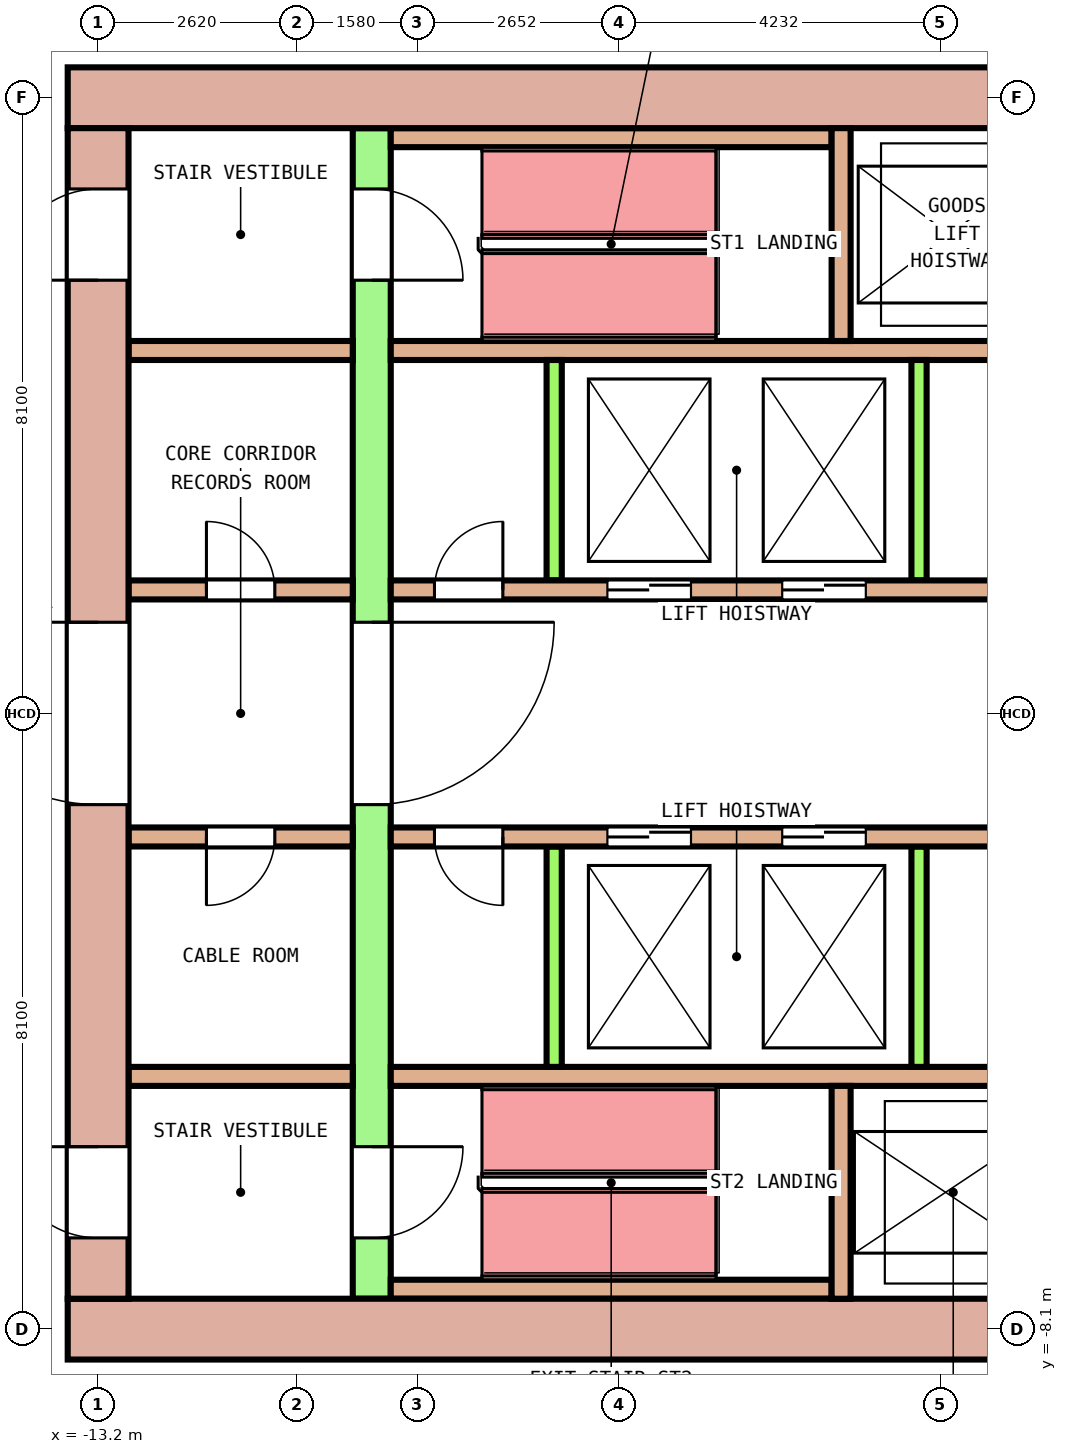
"""IFC4 building model, lengths in metres.
Left out: names, types, materials, properties, quantities, classifications, styles, units other than length and angle.
Written with IfcOpenShell. Run it as: python <this file> out.ifc"""

import sys

from ifc_helpers import new_model, si_unit, direction, frame, frame_2d, origin, place, context, subcontext, project, spatial, rectangle, extrude, element, fill, save


model = new_model("IFC4")
c1 = context("Model", 3, precision=1e-05, world=origin(), true_north=direction((0.0, 1.0)))
c2 = subcontext(c1, "Body", "Model", "MODEL_VIEW")
j1 = project(units=[si_unit("LENGTHUNIT", "METRE"), si_unit("PLANEANGLEUNIT", "RADIAN")], contexts=[c1])
p1 = place(None, origin())
s1 = spatial("IfcSite", under=j1, at=p1, CompositionType="ELEMENT")
p2 = place(p1, origin())
s2 = spatial("IfcBuilding", under=s1, at=p2, CompositionType="ELEMENT")
p3 = place(p2, frame((0.0, 0.0, 130.8)))
s3 = spatial("IfcBuildingStorey", under=s2, at=p3, CompositionType="ELEMENT", Elevation=130.8)
p4 = place(p3, frame((-13.6, 8.1, 0.0), z_axis=(0.0, 0.0, 1.0), x_axis=(1.0, 0.0, 0.0)))
e1 = element("IfcWall", 1, at=p4, inside=s3, PredefinedType="SHEAR", context=c2, shape_type="SweptSolid", body=[
    extrude(rectangle(XDim=27.2, YDim=0.8, at=frame_2d((13.6, 0.0))), origin(), (0.0, 0.0, 1.0), 4.1),
])
p5 = place(p4, frame((14.525, 0.0, 0.0)))
e2 = element("IfcOpeningElement", 2, at=p5, cuts=e1, PredefinedType="OPENING", context=c2, shape_type="SweptSolid", body=[
    extrude(rectangle(XDim=1.4, YDim=2.1, at=frame_2d((0.7, 1.05))), frame((0.0, 0.41, 0.0), z_axis=(0.0, -1.0, 0.0), x_axis=(1.0, 0.0, 0.0)), (0.0, 0.0, 1.0), 0.82),
])
p6 = place(p3, frame((-13.6, -8.1, 0.0), z_axis=(0.0, 0.0, 1.0), x_axis=(1.0, 0.0, 0.0)))
e3 = element("IfcWall", 3, at=p6, inside=s3, PredefinedType="SHEAR", context=c2, shape_type="SweptSolid", body=[
    extrude(rectangle(XDim=27.2, YDim=0.8, at=frame_2d((13.6, 0.0))), origin(), (0.0, 0.0, 1.0), 4.1),
])
p7 = place(p6, frame((15.15, 0.0, 0.0)))
e4 = element("IfcOpeningElement", 4, at=p7, cuts=e3, PredefinedType="OPENING", context=c2, shape_type="SweptSolid", body=[
    extrude(rectangle(XDim=1.2, YDim=2.1, at=frame_2d((0.6, 1.05))), frame((0.0, 0.41, 0.0), z_axis=(0.0, -1.0, 0.0), x_axis=(1.0, 0.0, 0.0)), (0.0, 0.0, 1.0), 0.82),
])
p8 = place(p3, frame((-13.2, -7.7, 0.0), z_axis=(0.0, 0.0, 1.0), x_axis=(0.0, 1.0, 0.0)))
e5 = element("IfcWall", 5, at=p8, inside=s3, PredefinedType="SHEAR", context=c2, shape_type="SweptSolid", body=[
    extrude(rectangle(XDim=15.4, YDim=0.8, at=frame_2d((7.7, 0.0))), origin(), (0.0, 0.0, 1.0), 4.1),
])
p9 = place(p8, frame((6.5, 0.0, 0.0)))
e6 = element("IfcOpeningElement", 6, at=p9, cuts=e5, PredefinedType="OPENING", context=c2, shape_type="SweptSolid", body=[
    extrude(rectangle(XDim=2.4, YDim=2.1, at=frame_2d((1.2, 1.05))), frame((0.0, 0.41, 0.0), z_axis=(0.0, -1.0, 0.0), x_axis=(1.0, 0.0, 0.0)), (0.0, 0.0, 1.0), 0.82),
])
p10 = place(p8, frame((13.4, 0.0, 0.0)))
e7 = element("IfcOpeningElement", 7, at=p10, cuts=e5, PredefinedType="OPENING", context=c2, shape_type="SweptSolid", body=[
    extrude(rectangle(XDim=1.2, YDim=2.1, at=frame_2d((0.6, 1.05))), frame((0.0, 0.41, 0.0), z_axis=(0.0, -1.0, 0.0), x_axis=(1.0, 0.0, 0.0)), (0.0, 0.0, 1.0), 0.82),
])
p11 = place(p8, frame((0.8, 0.0, 0.0)))
e8 = element("IfcOpeningElement", 8, at=p11, cuts=e5, PredefinedType="OPENING", context=c2, shape_type="SweptSolid", body=[
    extrude(rectangle(XDim=1.2, YDim=2.1, at=frame_2d((0.6, 1.05))), frame((0.0, 0.41, 0.0), z_axis=(0.0, -1.0, 0.0), x_axis=(1.0, 0.0, 0.0)), (0.0, 0.0, 1.0), 0.82),
])
p12 = place(p3, frame((-9.6, -7.7, 0.0), z_axis=(0.0, 0.0, 1.0), x_axis=(0.0, 1.0, 0.0)))
e9 = element("IfcWall", 9, at=p12, inside=s3, PredefinedType="SHEAR", context=c2, shape_type="SweptSolid", body=[
    extrude(rectangle(XDim=15.4, YDim=0.5, at=frame_2d((7.7, 0.0))), origin(), (0.0, 0.0, 1.0), 4.1),
])
p13 = place(p12, frame((6.5, 0.0, 0.0)))
e10 = element("IfcOpeningElement", 10, at=p13, cuts=e9, PredefinedType="OPENING", context=c2, shape_type="SweptSolid", body=[
    extrude(rectangle(XDim=2.4, YDim=2.1, at=frame_2d((1.2, 1.05))), frame((0.0, 0.26, 0.0), z_axis=(0.0, -1.0, 0.0), x_axis=(1.0, 0.0, 0.0)), (0.0, 0.0, 1.0), 0.52),
])
p14 = place(p12, frame((13.4, 0.0, 0.0)))
e11 = element("IfcOpeningElement", 11, at=p14, cuts=e9, PredefinedType="OPENING", context=c2, shape_type="SweptSolid", body=[
    extrude(rectangle(XDim=1.2, YDim=2.1, at=frame_2d((0.6, 1.05))), frame((0.0, 0.26, 0.0), z_axis=(0.0, -1.0, 0.0), x_axis=(1.0, 0.0, 0.0)), (0.0, 0.0, 1.0), 0.52),
])
p15 = place(p12, frame((0.8, 0.0, 0.0)))
e12 = element("IfcOpeningElement", 12, at=p15, cuts=e9, PredefinedType="OPENING", context=c2, shape_type="SweptSolid", body=[
    extrude(rectangle(XDim=1.2, YDim=2.1, at=frame_2d((0.6, 1.05))), frame((0.0, 0.26, 0.0), z_axis=(0.0, -1.0, 0.0), x_axis=(1.0, 0.0, 0.0)), (0.0, 0.0, 1.0), 0.52),
])
p16 = place(p3, frame((-12.8, 1.625, 0.0), z_axis=(0.0, 0.0, 1.0), x_axis=(1.0, 0.0, 0.0)))
e13 = element("IfcWall", 13, at=p16, inside=s3, PredefinedType="SOLIDWALL", context=c2, shape_type="SweptSolid", body=[
    extrude(rectangle(XDim=2.95, YDim=0.25, at=frame_2d((1.475, 0.0))), origin(), (0.0, 0.0, 1.0), 4.1),
])
p17 = place(p16, frame((1.025, 0.0, 0.0)))
e14 = element("IfcOpeningElement", 14, at=p17, cuts=e13, PredefinedType="OPENING", context=c2, shape_type="SweptSolid", body=[
    extrude(rectangle(XDim=0.9, YDim=2.1, at=frame_2d((0.45, 1.05))), frame((0.0, 0.135, 0.0), z_axis=(0.0, -1.0, 0.0), x_axis=(1.0, 0.0, 0.0)), (0.0, 0.0, 1.0), 0.27),
])
p18 = place(p3, frame((-9.35, 1.625, 0.0), z_axis=(0.0, 0.0, 1.0), x_axis=(1.0, 0.0, 0.0)))
e15 = element("IfcWall", 15, at=p18, inside=s3, PredefinedType="SOLIDWALL", context=c2, shape_type="SweptSolid", body=[
    extrude(rectangle(XDim=18.7, YDim=0.25, at=frame_2d((9.35, 0.0))), origin(), (0.0, 0.0, 1.0), 4.1),
])
p19 = place(p18, frame((2.85, 0.0, 0.0)))
e16 = element("IfcOpeningElement", 16, at=p19, cuts=e15, PredefinedType="OPENING", context=c2, shape_type="SweptSolid", body=[
    extrude(rectangle(XDim=1.1, YDim=2.1, at=frame_2d((0.55, 1.05))), frame((0.0, 0.135, 0.0), z_axis=(0.0, -1.0, 0.0), x_axis=(1.0, 0.0, 0.0)), (0.0, 0.0, 1.0), 0.27),
])
p20 = place(p18, frame((5.15, 0.0, 0.0)))
e17 = element("IfcOpeningElement", 17, at=p20, cuts=e15, PredefinedType="OPENING", context=c2, shape_type="SweptSolid", body=[
    extrude(rectangle(XDim=1.1, YDim=2.1, at=frame_2d((0.55, 1.05))), frame((0.0, 0.135, 0.0), z_axis=(0.0, -1.0, 0.0), x_axis=(1.0, 0.0, 0.0)), (0.0, 0.0, 1.0), 0.27),
])
p21 = place(p18, frame((14.8, 0.0, 0.0)))
e18 = element("IfcOpeningElement", 18, at=p21, cuts=e15, PredefinedType="OPENING", context=c2, shape_type="SweptSolid", body=[
    extrude(rectangle(XDim=1.1, YDim=2.1, at=frame_2d((0.55, 1.05))), frame((0.0, 0.135, 0.0), z_axis=(0.0, -1.0, 0.0), x_axis=(1.0, 0.0, 0.0)), (0.0, 0.0, 1.0), 0.27),
])
p22 = place(p18, frame((0.575, 0.0, 0.0)))
e19 = element("IfcOpeningElement", 19, at=p22, cuts=e15, PredefinedType="OPENING", context=c2, shape_type="SweptSolid", body=[
    extrude(rectangle(XDim=0.9, YDim=2.1, at=frame_2d((0.45, 1.05))), frame((0.0, 0.135, 0.0), z_axis=(0.0, -1.0, 0.0), x_axis=(1.0, 0.0, 0.0)), (0.0, 0.0, 1.0), 0.27),
])
p23 = place(p18, frame((17.225, 0.0, 0.0)))
e20 = element("IfcOpeningElement", 20, at=p23, cuts=e15, PredefinedType="OPENING", context=c2, shape_type="SweptSolid", body=[
    extrude(rectangle(XDim=0.9, YDim=2.1, at=frame_2d((0.45, 1.05))), frame((0.0, 0.135, 0.0), z_axis=(0.0, -1.0, 0.0), x_axis=(1.0, 0.0, 0.0)), (0.0, 0.0, 1.0), 0.27),
])
p24 = place(p3, frame((-12.8, 4.775, 0.0), z_axis=(0.0, 0.0, 1.0), x_axis=(1.0, 0.0, 0.0)))
e21 = element("IfcWall", 21, at=p24, inside=s3, PredefinedType="SOLIDWALL", context=c2, shape_type="SweptSolid", body=[
    extrude(rectangle(XDim=2.95, YDim=0.25, at=frame_2d((1.475, 0.0))), origin(), (0.0, 0.0, 1.0), 4.1),
])
p25 = place(p3, frame((-9.35, 4.775, 0.0), z_axis=(0.0, 0.0, 1.0), x_axis=(1.0, 0.0, 0.0)))
e22 = element("IfcWall", 22, at=p25, inside=s3, PredefinedType="SOLIDWALL", context=c2, shape_type="SweptSolid", body=[
    extrude(rectangle(XDim=18.7, YDim=0.25, at=frame_2d((9.35, 0.0))), origin(), (0.0, 0.0, 1.0), 4.1),
])
for number, where, z_axis, x_axis in (
    (23, (-7.2, 1.75, 0.0), (0.0, 0.0, 1.0), (0.0, 1.0, 0.0)),
    (24, (-2.4, 1.75, 0.0), (0.0, 0.0, 1.0), (0.0, 1.0, 0.0)),
):
    element("IfcWall", number, at=place(p3, frame(where, z_axis=z_axis, x_axis=x_axis)), inside=s3, PredefinedType="SOLIDWALL", context=c2, shape_type="SweptSolid", body=[
        extrude(rectangle(XDim=2.9, YDim=0.2, at=frame_2d((1.45, 0.0))), origin(), (0.0, 0.0, 1.0), 4.1),
    ])
p26 = place(p3, frame((-12.8, -1.625, 0.0), z_axis=(0.0, 0.0, 1.0), x_axis=(1.0, 0.0, 0.0)))
e25 = element("IfcWall", 25, at=p26, inside=s3, PredefinedType="SOLIDWALL", context=c2, shape_type="SweptSolid", body=[
    extrude(rectangle(XDim=2.95, YDim=0.25, at=frame_2d((1.475, 0.0))), origin(), (0.0, 0.0, 1.0), 4.1),
])
p27 = place(p26, frame((1.025, 0.0, 0.0)))
e26 = element("IfcOpeningElement", 26, at=p27, cuts=e25, PredefinedType="OPENING", context=c2, shape_type="SweptSolid", body=[
    extrude(rectangle(XDim=0.9, YDim=2.1, at=frame_2d((0.45, 1.05))), frame((0.0, 0.135, 0.0), z_axis=(0.0, -1.0, 0.0), x_axis=(1.0, 0.0, 0.0)), (0.0, 0.0, 1.0), 0.27),
])
p28 = place(p3, frame((-9.35, -1.625, 0.0), z_axis=(0.0, 0.0, 1.0), x_axis=(1.0, 0.0, 0.0)))
e27 = element("IfcWall", 27, at=p28, inside=s3, PredefinedType="SOLIDWALL", context=c2, shape_type="SweptSolid", body=[
    extrude(rectangle(XDim=18.7, YDim=0.25, at=frame_2d((9.35, 0.0))), origin(), (0.0, 0.0, 1.0), 4.1),
])
p29 = place(p28, frame((2.85, 0.0, 0.0)))
e28 = element("IfcOpeningElement", 28, at=p29, cuts=e27, PredefinedType="OPENING", context=c2, shape_type="SweptSolid", body=[
    extrude(rectangle(XDim=1.1, YDim=2.1, at=frame_2d((0.55, 1.05))), frame((0.0, 0.135, 0.0), z_axis=(0.0, -1.0, 0.0), x_axis=(1.0, 0.0, 0.0)), (0.0, 0.0, 1.0), 0.27),
])
p30 = place(p28, frame((5.15, 0.0, 0.0)))
e29 = element("IfcOpeningElement", 29, at=p30, cuts=e27, PredefinedType="OPENING", context=c2, shape_type="SweptSolid", body=[
    extrude(rectangle(XDim=1.1, YDim=2.1, at=frame_2d((0.55, 1.05))), frame((0.0, 0.135, 0.0), z_axis=(0.0, -1.0, 0.0), x_axis=(1.0, 0.0, 0.0)), (0.0, 0.0, 1.0), 0.27),
])
p31 = place(p28, frame((14.8, 0.0, 0.0)))
e30 = element("IfcOpeningElement", 30, at=p31, cuts=e27, PredefinedType="OPENING", context=c2, shape_type="SweptSolid", body=[
    extrude(rectangle(XDim=1.1, YDim=2.1, at=frame_2d((0.55, 1.05))), frame((0.0, 0.135, 0.0), z_axis=(0.0, -1.0, 0.0), x_axis=(1.0, 0.0, 0.0)), (0.0, 0.0, 1.0), 0.27),
])
p32 = place(p28, frame((0.575, 0.0, 0.0)))
e31 = element("IfcOpeningElement", 31, at=p32, cuts=e27, PredefinedType="OPENING", context=c2, shape_type="SweptSolid", body=[
    extrude(rectangle(XDim=0.9, YDim=2.1, at=frame_2d((0.45, 1.05))), frame((0.0, 0.135, 0.0), z_axis=(0.0, -1.0, 0.0), x_axis=(1.0, 0.0, 0.0)), (0.0, 0.0, 1.0), 0.27),
])
p33 = place(p28, frame((17.225, 0.0, 0.0)))
e32 = element("IfcOpeningElement", 32, at=p33, cuts=e27, PredefinedType="OPENING", context=c2, shape_type="SweptSolid", body=[
    extrude(rectangle(XDim=0.9, YDim=2.1, at=frame_2d((0.45, 1.05))), frame((0.0, 0.135, 0.0), z_axis=(0.0, -1.0, 0.0), x_axis=(1.0, 0.0, 0.0)), (0.0, 0.0, 1.0), 0.27),
])
p34 = place(p3, frame((-12.8, -4.775, 0.0), z_axis=(0.0, 0.0, 1.0), x_axis=(1.0, 0.0, 0.0)))
e33 = element("IfcWall", 33, at=p34, inside=s3, PredefinedType="SOLIDWALL", context=c2, shape_type="SweptSolid", body=[
    extrude(rectangle(XDim=2.95, YDim=0.25, at=frame_2d((1.475, 0.0))), origin(), (0.0, 0.0, 1.0), 4.1),
])
p35 = place(p3, frame((-9.35, -4.775, 0.0), z_axis=(0.0, 0.0, 1.0), x_axis=(1.0, 0.0, 0.0)))
e34 = element("IfcWall", 34, at=p35, inside=s3, PredefinedType="SOLIDWALL", context=c2, shape_type="SweptSolid", body=[
    extrude(rectangle(XDim=18.7, YDim=0.25, at=frame_2d((9.35, 0.0))), origin(), (0.0, 0.0, 1.0), 4.1),
])
for number, where, z_axis, x_axis in (
    (35, (-7.2, -4.65, 0.0), (0.0, 0.0, 1.0), (0.0, 1.0, 0.0)),
    (36, (-2.4, -4.65, 0.0), (0.0, 0.0, 1.0), (0.0, 1.0, 0.0)),
):
    element("IfcWall", number, at=place(p3, frame(where, z_axis=z_axis, x_axis=x_axis)), inside=s3, PredefinedType="SOLIDWALL", context=c2, shape_type="SweptSolid", body=[
        extrude(rectangle(XDim=2.9, YDim=0.2, at=frame_2d((1.45, 0.0))), origin(), (0.0, 0.0, 1.0), 4.1),
    ])
p36 = place(p3, frame((-9.35, 7.575, 0.0), z_axis=(0.0, 0.0, 1.0), x_axis=(1.0, 0.0, 0.0)))
e37 = element("IfcWall", 37, at=p36, inside=s3, PredefinedType="SOLIDWALL", context=c2, shape_type="SweptSolid", body=[
    extrude(rectangle(XDim=5.8, YDim=0.25, at=frame_2d((2.9, 0.0))), origin(), (0.0, 0.0, 1.0), 4.1),
])
p37 = place(p3, frame((-3.425, 4.9, 0.0), z_axis=(0.0, 0.0, 1.0), x_axis=(0.0, 1.0, 0.0)))
e38 = element("IfcWall", 38, at=p37, inside=s3, PredefinedType="SOLIDWALL", context=c2, shape_type="SweptSolid", body=[
    extrude(rectangle(XDim=2.8, YDim=0.25, at=frame_2d((1.4, 0.0))), origin(), (0.0, 0.0, 1.0), 4.1),
])
p38 = place(p3, frame((-9.35, -7.575, 0.0), z_axis=(0.0, 0.0, 1.0), x_axis=(1.0, 0.0, 0.0)))
e39 = element("IfcWall", 39, at=p38, inside=s3, PredefinedType="SOLIDWALL", context=c2, shape_type="SweptSolid", body=[
    extrude(rectangle(XDim=5.8, YDim=0.25, at=frame_2d((2.9, 0.0))), origin(), (0.0, 0.0, 1.0), 4.1),
])
p39 = place(p3, frame((-3.425, -7.7, 0.0), z_axis=(0.0, 0.0, 1.0), x_axis=(0.0, 1.0, 0.0)))
e40 = element("IfcWall", 40, at=p39, inside=s3, PredefinedType="SOLIDWALL", context=c2, shape_type="SweptSolid", body=[
    extrude(rectangle(XDim=2.8, YDim=0.25, at=frame_2d((1.4, 0.0))), origin(), (0.0, 0.0, 1.0), 4.1),
])
p40 = place(p19, origin())
e41 = element("IfcDoor", 41, at=p40, inside=s3, OperationType="DOUBLE_DOOR_SLIDING", PredefinedType="DOOR", context=c2, shape_type="SweptSolid", body=[
    extrude(rectangle(XDim=1.1, YDim=2.1, at=frame_2d((0.55, 1.05))), frame((0.0, 0.075, 0.0), z_axis=(0.0, -1.0, 0.0), x_axis=(1.0, 0.0, 0.0)), (0.0, 0.0, 1.0), 0.15),
])
fill(e16, e41)
p41 = place(p20, origin())
e42 = element("IfcDoor", 42, at=p41, inside=s3, OperationType="DOUBLE_DOOR_SLIDING", PredefinedType="DOOR", context=c2, shape_type="SweptSolid", body=[
    extrude(rectangle(XDim=1.1, YDim=2.1, at=frame_2d((0.55, 1.05))), frame((0.0, 0.075, 0.0), z_axis=(0.0, -1.0, 0.0), x_axis=(1.0, 0.0, 0.0)), (0.0, 0.0, 1.0), 0.15),
])
fill(e17, e42)
p42 = place(p29, origin())
e43 = element("IfcDoor", 43, at=p42, inside=s3, OperationType="DOUBLE_DOOR_SLIDING", PredefinedType="DOOR", context=c2, shape_type="SweptSolid", body=[
    extrude(rectangle(XDim=1.1, YDim=2.1, at=frame_2d((0.55, 1.05))), frame((0.0, 0.075, 0.0), z_axis=(0.0, -1.0, 0.0), x_axis=(1.0, 0.0, 0.0)), (0.0, 0.0, 1.0), 0.15),
])
fill(e28, e43)
p43 = place(p30, origin())
e44 = element("IfcDoor", 44, at=p43, inside=s3, OperationType="DOUBLE_DOOR_SLIDING", PredefinedType="DOOR", context=c2, shape_type="SweptSolid", body=[
    extrude(rectangle(XDim=1.1, YDim=2.1, at=frame_2d((0.55, 1.05))), frame((0.0, 0.075, 0.0), z_axis=(0.0, -1.0, 0.0), x_axis=(1.0, 0.0, 0.0)), (0.0, 0.0, 1.0), 0.15),
])
fill(e29, e44)
p44 = place(p13, origin())
e45 = element("IfcDoor", 45, at=p44, inside=s3, OperationType="DOUBLE_DOOR_SINGLE_SWING", PredefinedType="DOOR", context=c2, shape_type="SweptSolid", body=[
    extrude(rectangle(XDim=2.4, YDim=2.1, at=frame_2d((1.2, 1.05))), frame((0.0, 0.2, 0.0), z_axis=(0.0, -1.0, 0.0), x_axis=(1.0, 0.0, 0.0)), (0.0, 0.0, 1.0), 0.4),
])
fill(e10, e45)
p45 = place(p9, origin())
e46 = element("IfcDoor", 46, at=p45, inside=s3, OperationType="DOUBLE_DOOR_SINGLE_SWING", PredefinedType="DOOR", context=c2, shape_type="SweptSolid", body=[
    extrude(rectangle(XDim=2.4, YDim=2.1, at=frame_2d((1.2, 1.05))), frame((0.0, 0.3, 0.0), z_axis=(0.0, -1.0, 0.0), x_axis=(1.0, 0.0, 0.0)), (0.0, 0.0, 1.0), 0.6),
])
fill(e6, e46)
p46 = place(p14, origin())
e47 = element("IfcDoor", 47, at=p46, inside=s3, OperationType="SINGLE_SWING_RIGHT", PredefinedType="DOOR", context=c2, shape_type="SweptSolid", body=[
    extrude(rectangle(XDim=1.2, YDim=2.1, at=frame_2d((0.6, 1.05))), frame((0.0, 0.2, 0.0), z_axis=(0.0, -1.0, 0.0), x_axis=(1.0, 0.0, 0.0)), (0.0, 0.0, 1.0), 0.4),
])
fill(e11, e47)
p47 = place(p10, origin())
e48 = element("IfcDoor", 48, at=p47, inside=s3, OperationType="SINGLE_SWING_LEFT", PredefinedType="DOOR", context=c2, shape_type="SweptSolid", body=[
    extrude(rectangle(XDim=1.2, YDim=2.1, at=frame_2d((0.6, 1.05))), frame((0.0, 0.3, 0.0), z_axis=(0.0, -1.0, 0.0), x_axis=(1.0, 0.0, 0.0)), (0.0, 0.0, 1.0), 0.6),
])
fill(e7, e48)
p48 = place(p15, origin())
e49 = element("IfcDoor", 49, at=p48, inside=s3, OperationType="SINGLE_SWING_RIGHT", PredefinedType="DOOR", context=c2, shape_type="SweptSolid", body=[
    extrude(rectangle(XDim=1.2, YDim=2.1, at=frame_2d((0.6, 1.05))), frame((0.0, 0.2, 0.0), z_axis=(0.0, -1.0, 0.0), x_axis=(1.0, 0.0, 0.0)), (0.0, 0.0, 1.0), 0.4),
])
fill(e12, e49)
p49 = place(p11, origin())
e50 = element("IfcDoor", 50, at=p49, inside=s3, OperationType="SINGLE_SWING_LEFT", PredefinedType="DOOR", context=c2, shape_type="SweptSolid", body=[
    extrude(rectangle(XDim=1.2, YDim=2.1, at=frame_2d((0.6, 1.05))), frame((0.0, 0.3, 0.0), z_axis=(0.0, -1.0, 0.0), x_axis=(1.0, 0.0, 0.0)), (0.0, 0.0, 1.0), 0.6),
])
fill(e8, e50)
p50 = place(p17, origin())
e51 = element("IfcDoor", 51, at=p50, inside=s3, OperationType="SINGLE_SWING_RIGHT", PredefinedType="DOOR", context=c2, shape_type="SweptSolid", body=[
    extrude(rectangle(XDim=0.9, YDim=2.1, at=frame_2d((0.45, 1.05))), frame((0.0, 0.075, 0.0), z_axis=(0.0, -1.0, 0.0), x_axis=(1.0, 0.0, 0.0)), (0.0, 0.0, 1.0), 0.15),
])
fill(e14, e51)
p51 = place(p22, origin())
e52 = element("IfcDoor", 52, at=p51, inside=s3, OperationType="SINGLE_SWING_LEFT", PredefinedType="DOOR", context=c2, shape_type="SweptSolid", body=[
    extrude(rectangle(XDim=0.9, YDim=2.1, at=frame_2d((0.45, 1.05))), frame((0.0, 0.075, 0.0), z_axis=(0.0, -1.0, 0.0), x_axis=(1.0, 0.0, 0.0)), (0.0, 0.0, 1.0), 0.15),
])
fill(e19, e52)
p52 = place(p27, origin())
e53 = element("IfcDoor", 53, at=p52, inside=s3, OperationType="SINGLE_SWING_RIGHT", PredefinedType="DOOR", context=c2, shape_type="SweptSolid", body=[
    extrude(rectangle(XDim=0.9, YDim=2.1, at=frame_2d((0.45, 1.05))), frame((0.0, 0.075, 0.0), z_axis=(0.0, -1.0, 0.0), x_axis=(1.0, 0.0, 0.0)), (0.0, 0.0, 1.0), 0.15),
])
fill(e26, e53)
p53 = place(p32, origin())
e54 = element("IfcDoor", 54, at=p53, inside=s3, OperationType="SINGLE_SWING_LEFT", PredefinedType="DOOR", context=c2, shape_type="SweptSolid", body=[
    extrude(rectangle(XDim=0.9, YDim=2.1, at=frame_2d((0.45, 1.05))), frame((0.0, 0.075, 0.0), z_axis=(0.0, -1.0, 0.0), x_axis=(1.0, 0.0, 0.0)), (0.0, 0.0, 1.0), 0.15),
])
fill(e31, e54)
save(model, sys.argv[1])
